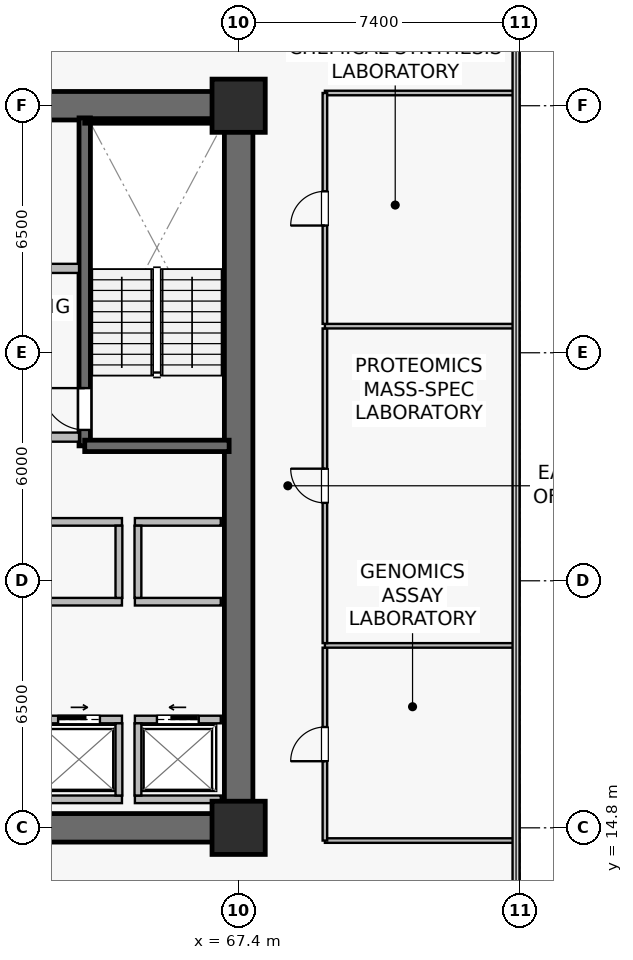
"""IFC4 building model, lengths in metres.
Left out: names, types, materials, properties, quantities, classifications, styles, units other than length and angle.
Written with IfcOpenShell. Run it as: python <this file> out.ifc"""

import sys

from ifc_helpers import new_model, si_unit, direction, frame, frame_2d, origin, origin_2d, place, context, subcontext, project, spatial, rectangle, extrude, source, transform, mapped, element, fill, save


model = new_model("IFC4")
c1 = context("Model", 3, precision=1e-05, world=origin(), true_north=direction((0.0, 1.0)))
c2 = subcontext(c1, "Body", "Model", "MODEL_VIEW")
j1 = project(units=[si_unit("LENGTHUNIT", "METRE"), si_unit("PLANEANGLEUNIT", "RADIAN")], contexts=[c1])
p1 = place(None, origin())
s1 = spatial("IfcSite", under=j1, at=p1, CompositionType="ELEMENT")
p2 = place(p1, origin())
s2 = spatial("IfcBuilding", under=s1, at=p2, CompositionType="ELEMENT")
p3 = place(p2, frame((0.0, 0.0, 45.7)))
s3 = spatial("IfcBuildingStorey", under=s2, at=p3, CompositionType="ELEMENT", Elevation=45.7)
p4 = place(p3, frame((52.225, 14.8, 0.0), z_axis=(0.0, 0.0, 1.0), x_axis=(1.0, 0.0, 0.0)))
e1 = element("IfcWall", 1, at=p4, inside=s3, PredefinedType="SHEAR", context=c2, shape_type="SweptSolid", body=[
    extrude(rectangle(XDim=15.55, YDim=0.75, at=frame_2d((7.775, 0.0))), origin(), (0.0, 0.0, 1.0), 3.78),
])
p5 = place(p3, frame((52.225, 33.8, 0.0), z_axis=(0.0, 0.0, 1.0), x_axis=(1.0, 0.0, 0.0)))
e2 = element("IfcWall", 2, at=p5, inside=s3, PredefinedType="SHEAR", context=c2, shape_type="SweptSolid", body=[
    extrude(rectangle(XDim=15.55, YDim=0.75, at=frame_2d((7.775, 0.0))), origin(), (0.0, 0.0, 1.0), 3.78),
])
p6 = place(p5, frame((8.875, 0.0, 0.0)))
e3 = element("IfcOpeningElement", 3, at=p6, cuts=e2, PredefinedType="OPENING", context=c2, shape_type="SweptSolid", body=[
    extrude(rectangle(XDim=0.95, YDim=2.15, at=frame_2d((0.475, 1.075))), frame((0.0, 0.385, 0.0), z_axis=(0.0, -1.0, 0.0), x_axis=(1.0, 0.0, 0.0)), (0.0, 0.0, 1.0), 0.77),
])
p7 = place(p5, frame((5.51, 0.0, 0.0)))
e4 = element("IfcOpeningElement", 4, at=p7, cuts=e2, PredefinedType="OPENING", context=c2, shape_type="SweptSolid", body=[
    extrude(rectangle(XDim=0.95, YDim=2.15, at=frame_2d((0.475, 1.075))), frame((0.0, 0.385, 0.0), z_axis=(0.0, -1.0, 0.0), x_axis=(1.0, 0.0, 0.0)), (0.0, 0.0, 1.0), 0.77),
])
p8 = place(p5, frame((2.11, 0.0, 0.0)))
e5 = element("IfcOpeningElement", 5, at=p8, cuts=e2, PredefinedType="OPENING", context=c2, shape_type="SweptSolid", body=[
    extrude(rectangle(XDim=0.95, YDim=2.15, at=frame_2d((0.475, 1.075))), frame((0.0, 0.385, 0.0), z_axis=(0.0, -1.0, 0.0), x_axis=(1.0, 0.0, 0.0)), (0.0, 0.0, 1.0), 0.77),
])
p9 = place(p3, frame((67.4, 15.175, 0.0), z_axis=(0.0, 0.0, 1.0), x_axis=(0.0, 1.0, 0.0)))
e6 = element("IfcWall", 6, at=p9, inside=s3, PredefinedType="SHEAR", context=c2, shape_type="SweptSolid", body=[
    extrude(rectangle(XDim=18.25, YDim=0.75, at=frame_2d((9.125, 0.0))), origin(), (0.0, 0.0, 1.0), 3.78),
])
p10 = place(p3, frame((63.35, 24.85, 0.0), z_axis=(0.0, 0.0, 1.0), x_axis=(0.0, 1.0, 0.0)))
e7 = element("IfcWall", 7, at=p10, inside=s3, PredefinedType="SHEAR", context=c2, shape_type="SweptSolid", body=[
    extrude(rectangle(XDim=8.63, YDim=0.3, at=frame_2d((4.315, 0.0))), origin(), (0.0, 0.0, 1.0), 3.78),
])
p11 = place(p10, frame((0.42, 0.0, 0.0)))
e8 = element("IfcOpeningElement", 8, at=p11, cuts=e7, PredefinedType="OPENING", context=c2, shape_type="SweptSolid", body=[
    extrude(rectangle(XDim=1.1, YDim=2.15, at=frame_2d((0.55, 1.075))), frame((0.0, 0.16, 0.0), z_axis=(0.0, -1.0, 0.0), x_axis=(1.0, 0.0, 0.0)), (0.0, 0.0, 1.0), 0.32),
])
p12 = place(p3, frame((63.35, 24.85, 0.0), z_axis=(0.0, 0.0, 1.0), x_axis=(1.0, 0.0, 0.0)))
e9 = element("IfcWall", 9, at=p12, inside=s3, PredefinedType="SHEAR", context=c2, shape_type="SweptSolid", body=[
    extrude(rectangle(XDim=3.8, YDim=0.3, at=frame_2d((1.9, 0.0))), origin(), (0.0, 0.0, 1.0), 3.78),
])
p13 = place(p3, frame((63.35, 33.4, 0.0), z_axis=(0.0, 0.0, 1.0), x_axis=(1.0, 0.0, 0.0)))
e10 = element("IfcWall", 10, at=p13, inside=s3, PredefinedType="SOLIDWALL", context=c2, shape_type="SweptSolid", body=[
    extrude(rectangle(XDim=3.72, YDim=0.12, at=frame_2d((1.86, 0.0))), origin(), (0.0, 0.0, 1.0), 3.78),
])
m1 = source(origin(), c2, "Body", "SweptSolid", [
    extrude(rectangle(XDim=1.4, YDim=1.4, at=origin_2d()), origin(), (0.0, 0.0, 1.0), 4.1),
])
for number, where, z_axis, x_axis in (
    (11, (67.4, 14.8, 0.0), (0.0, 0.0, 1.0), (1.0, 0.0, 0.0)),
    (12, (67.4, 33.8, 0.0), (0.0, 0.0, 1.0), (1.0, 0.0, 0.0)),
):
    element("IfcColumn", number, at=place(p3, frame(where, z_axis=z_axis, x_axis=x_axis)), inside=s3, PredefinedType="COLUMN", context=c2, shape_type="MappedRepresentation", body=[
        mapped(m1, transform((0.0, 0.0, 0.0), scale=1.0)),
    ])
p14 = place(p3, frame((56.28, 25.08, 0.0), z_axis=(0.0, 0.0, 1.0), x_axis=(1.0, 0.0, 0.0)))
e13 = element("IfcWall", 13, at=p14, inside=s3, PredefinedType="SOLIDWALL", context=c2, shape_type="SweptSolid", body=[
    extrude(rectangle(XDim=6.92, YDim=0.24, at=frame_2d((3.46, 0.0))), origin(), (0.0, 0.0, 1.0), 3.065),
])
p15 = place(p14, frame((2.6, 0.0, 0.0)))
e14 = element("IfcOpeningElement", 14, at=p15, cuts=e13, PredefinedType="OPENING", context=c2, shape_type="SweptSolid", body=[
    extrude(rectangle(XDim=1.2, YDim=2.16, at=frame_2d((0.6, 1.08))), frame((0.0, 0.13, 0.0), z_axis=(0.0, -1.0, 0.0), x_axis=(1.0, 0.0, 0.0)), (0.0, 0.0, 1.0), 0.26),
])
p16 = place(p3, frame((56.28, 29.52, 0.0), z_axis=(0.0, 0.0, 1.0), x_axis=(1.0, 0.0, 0.0)))
e15 = element("IfcWall", 15, at=p16, inside=s3, PredefinedType="SOLIDWALL", context=c2, shape_type="SweptSolid", body=[
    extrude(rectangle(XDim=6.92, YDim=0.24, at=frame_2d((3.46, 0.0))), origin(), (0.0, 0.0, 1.0), 3.065),
])
p17 = place(p3, frame((64.67, 17.65, 0.0), z_axis=(0.0, 0.0, 1.0), x_axis=(1.0, 0.0, 0.0)))
e16 = element("IfcWall", 16, at=p17, inside=s3, PredefinedType="SOLIDWALL", context=c2, shape_type="SweptSolid", body=[
    extrude(rectangle(XDim=2.26, YDim=0.2, at=frame_2d((1.13, 0.0))), origin(), (0.0, 0.0, 1.0), 3.78),
])
p18 = place(p17, frame((0.58, 0.0, 0.0)))
e17 = element("IfcOpeningElement", 17, at=p18, cuts=e16, PredefinedType="OPENING", context=c2, shape_type="SweptSolid", body=[
    extrude(rectangle(XDim=1.1, YDim=2.22, at=frame_2d((0.55, 1.11))), frame((0.0, 0.11, 0.0), z_axis=(0.0, -1.0, 0.0), x_axis=(1.0, 0.0, 0.0)), (0.0, 0.0, 1.0), 0.22),
])
p19 = place(p3, frame((64.67, 15.55, 0.0), z_axis=(0.0, 0.0, 1.0), x_axis=(1.0, 0.0, 0.0)))
e18 = element("IfcWall", 18, at=p19, inside=s3, PredefinedType="SOLIDWALL", context=c2, shape_type="SweptSolid", body=[
    extrude(rectangle(XDim=2.26, YDim=0.2, at=frame_2d((1.13, 0.0))), origin(), (0.0, 0.0, 1.0), 3.78),
])
p20 = place(p3, frame((64.75, 15.65, 0.0), z_axis=(0.0, 0.0, 1.0), x_axis=(0.0, 1.0, 0.0)))
e19 = element("IfcWall", 19, at=p20, inside=s3, PredefinedType="SOLIDWALL", context=c2, shape_type="SweptSolid", body=[
    extrude(rectangle(XDim=1.9, YDim=0.18, at=frame_2d((0.95, 0.0))), origin(), (0.0, 0.0, 1.0), 3.78),
])
p21 = place(p3, frame((62.07, 17.65, 0.0), z_axis=(0.0, 0.0, 1.0), x_axis=(1.0, 0.0, 0.0)))
e20 = element("IfcWall", 20, at=p21, inside=s3, PredefinedType="SOLIDWALL", context=c2, shape_type="SweptSolid", body=[
    extrude(rectangle(XDim=2.26, YDim=0.2, at=frame_2d((1.13, 0.0))), origin(), (0.0, 0.0, 1.0), 3.78),
])
p22 = place(p21, frame((0.58, 0.0, 0.0)))
e21 = element("IfcOpeningElement", 21, at=p22, cuts=e20, PredefinedType="OPENING", context=c2, shape_type="SweptSolid", body=[
    extrude(rectangle(XDim=1.1, YDim=2.22, at=frame_2d((0.55, 1.11))), frame((0.0, 0.11, 0.0), z_axis=(0.0, -1.0, 0.0), x_axis=(1.0, 0.0, 0.0)), (0.0, 0.0, 1.0), 0.22),
])
p23 = place(p3, frame((62.07, 15.55, 0.0), z_axis=(0.0, 0.0, 1.0), x_axis=(1.0, 0.0, 0.0)))
e22 = element("IfcWall", 22, at=p23, inside=s3, PredefinedType="SOLIDWALL", context=c2, shape_type="SweptSolid", body=[
    extrude(rectangle(XDim=2.26, YDim=0.2, at=frame_2d((1.13, 0.0))), origin(), (0.0, 0.0, 1.0), 3.78),
])
p24 = place(p3, frame((64.25, 15.65, 0.0), z_axis=(0.0, 0.0, 1.0), x_axis=(0.0, 1.0, 0.0)))
e23 = element("IfcWall", 23, at=p24, inside=s3, PredefinedType="SOLIDWALL", context=c2, shape_type="SweptSolid", body=[
    extrude(rectangle(XDim=1.9, YDim=0.18, at=frame_2d((0.95, 0.0))), origin(), (0.0, 0.0, 1.0), 3.78),
])
for number, where, z_axis, x_axis in (
    (24, (64.67, 20.75, 0.0), (0.0, 0.0, 1.0), (1.0, 0.0, 0.0)),
    (25, (64.67, 22.85, 0.0), (0.0, 0.0, 1.0), (1.0, 0.0, 0.0)),
):
    element("IfcWall", number, at=place(p3, frame(where, z_axis=z_axis, x_axis=x_axis)), inside=s3, PredefinedType="SOLIDWALL", context=c2, shape_type="SweptSolid", body=[
        extrude(rectangle(XDim=2.26, YDim=0.2, at=frame_2d((1.13, 0.0))), origin(), (0.0, 0.0, 1.0), 3.78),
    ])
p25 = place(p3, frame((64.75, 20.85, 0.0), z_axis=(0.0, 0.0, 1.0), x_axis=(0.0, 1.0, 0.0)))
e26 = element("IfcWall", 26, at=p25, inside=s3, PredefinedType="SOLIDWALL", context=c2, shape_type="SweptSolid", body=[
    extrude(rectangle(XDim=1.9, YDim=0.18, at=frame_2d((0.95, 0.0))), origin(), (0.0, 0.0, 1.0), 3.78),
])
for number, where, z_axis, x_axis in (
    (27, (62.07, 20.75, 0.0), (0.0, 0.0, 1.0), (1.0, 0.0, 0.0)),
    (28, (62.07, 22.85, 0.0), (0.0, 0.0, 1.0), (1.0, 0.0, 0.0)),
):
    element("IfcWall", number, at=place(p3, frame(where, z_axis=z_axis, x_axis=x_axis)), inside=s3, PredefinedType="SOLIDWALL", context=c2, shape_type="SweptSolid", body=[
        extrude(rectangle(XDim=2.26, YDim=0.2, at=frame_2d((1.13, 0.0))), origin(), (0.0, 0.0, 1.0), 3.78),
    ])
p26 = place(p3, frame((64.25, 20.85, 0.0), z_axis=(0.0, 0.0, 1.0), x_axis=(0.0, 1.0, 0.0)))
e29 = element("IfcWall", 29, at=p26, inside=s3, PredefinedType="SOLIDWALL", context=c2, shape_type="SweptSolid", body=[
    extrude(rectangle(XDim=1.9, YDim=0.18, at=frame_2d((0.95, 0.0))), origin(), (0.0, 0.0, 1.0), 3.78),
])
for number, where, z_axis, x_axis in (
    (30, (69.67, 14.465, 0.0), (0.0, 0.0, 1.0), (1.0, 0.0, 0.0)),
    (31, (69.67, 34.135, 0.0), (0.0, 0.0, 1.0), (1.0, 0.0, 0.0)),
):
    element("IfcWall", number, at=place(p3, frame(where, z_axis=z_axis, x_axis=x_axis)), inside=s3, PredefinedType="PARTITIONING", context=c2, shape_type="SweptSolid", body=[
        extrude(rectangle(XDim=5.02, YDim=0.12, at=frame_2d((2.51, 0.0))), origin(), (0.0, 0.0, 1.0), 3.78),
    ])
p27 = place(p3, frame((69.67, 14.465, 0.0), z_axis=(0.0, 0.0, 1.0), x_axis=(0.0, 1.0, 0.0)))
e32 = element("IfcWall", 32, at=p27, inside=s3, PredefinedType="PARTITIONING", context=c2, shape_type="SweptSolid", body=[
    extrude(rectangle(XDim=5.075, YDim=0.12, at=frame_2d((2.538, 0.0))), origin(), (0.0, 0.0, 1.0), 3.78),
])
p28 = place(p27, frame((2.087, 0.0, 0.0)))
e33 = element("IfcOpeningElement", 33, at=p28, cuts=e32, PredefinedType="OPENING", context=c2, shape_type="SweptSolid", body=[
    extrude(rectangle(XDim=0.9, YDim=2.1, at=frame_2d((0.45, 1.05))), frame((0.0, 0.07, 0.0), z_axis=(0.0, -1.0, 0.0), x_axis=(1.0, 0.0, 0.0)), (0.0, 0.0, 1.0), 0.14),
])
p29 = place(p3, frame((69.67, 19.6, 0.0), z_axis=(0.0, 0.0, 1.0), x_axis=(1.0, 0.0, 0.0)))
e34 = element("IfcWall", 34, at=p29, inside=s3, PredefinedType="PARTITIONING", context=c2, shape_type="SweptSolid", body=[
    extrude(rectangle(XDim=5.02, YDim=0.12, at=frame_2d((2.51, 0.0))), origin(), (0.0, 0.0, 1.0), 3.78),
])
p30 = place(p3, frame((69.67, 19.66, 0.0), z_axis=(0.0, 0.0, 1.0), x_axis=(0.0, 1.0, 0.0)))
e35 = element("IfcWall", 35, at=p30, inside=s3, PredefinedType="PARTITIONING", context=c2, shape_type="SweptSolid", body=[
    extrude(rectangle(XDim=8.28, YDim=0.12, at=frame_2d((4.14, 0.0))), origin(), (0.0, 0.0, 1.0), 3.78),
])
p31 = place(p30, frame((3.69, 0.0, 0.0)))
e36 = element("IfcOpeningElement", 36, at=p31, cuts=e35, PredefinedType="OPENING", context=c2, shape_type="SweptSolid", body=[
    extrude(rectangle(XDim=0.9, YDim=2.1, at=frame_2d((0.45, 1.05))), frame((0.0, 0.07, 0.0), z_axis=(0.0, -1.0, 0.0), x_axis=(1.0, 0.0, 0.0)), (0.0, 0.0, 1.0), 0.14),
])
p32 = place(p3, frame((69.67, 28.0, 0.0), z_axis=(0.0, 0.0, 1.0), x_axis=(1.0, 0.0, 0.0)))
e37 = element("IfcWall", 37, at=p32, inside=s3, PredefinedType="PARTITIONING", context=c2, shape_type="SweptSolid", body=[
    extrude(rectangle(XDim=5.02, YDim=0.12, at=frame_2d((2.51, 0.0))), origin(), (0.0, 0.0, 1.0), 3.78),
])
p33 = place(p3, frame((69.67, 28.06, 0.0), z_axis=(0.0, 0.0, 1.0), x_axis=(0.0, 1.0, 0.0)))
e38 = element("IfcWall", 38, at=p33, inside=s3, PredefinedType="PARTITIONING", context=c2, shape_type="SweptSolid", body=[
    extrude(rectangle(XDim=6.075, YDim=0.12, at=frame_2d((3.038, 0.0))), origin(), (0.0, 0.0, 1.0), 3.78),
])
p34 = place(p33, frame((2.587, 0.0, 0.0)))
e39 = element("IfcOpeningElement", 39, at=p34, cuts=e38, PredefinedType="OPENING", context=c2, shape_type="SweptSolid", body=[
    extrude(rectangle(XDim=0.9, YDim=2.1, at=frame_2d((0.45, 1.05))), frame((0.0, 0.07, 0.0), z_axis=(0.0, -1.0, 0.0), x_axis=(1.0, 0.0, 0.0)), (0.0, 0.0, 1.0), 0.14),
])
m2 = source(origin(), c2, "Body", "SweptSolid", [
    extrude(rectangle(XDim=1.1, YDim=2.15, at=frame_2d((0.55, 1.075))), frame((0.0, 0.025, 0.0), z_axis=(0.0, -1.0, 0.0), x_axis=(1.0, 0.0, 0.0)), (0.0, 0.0, 1.0), 0.05),
])
p35 = place(p11, origin())
e40 = element("IfcDoor", 40, at=p35, inside=s3, OperationType="SINGLE_SWING_RIGHT", PredefinedType="DOOR", context=c2, shape_type="MappedRepresentation", body=[
    mapped(m2, transform((0.0, 0.0, 0.0), scale=1.0)),
])
fill(e8, e40)
m3 = source(origin(), c2, "Body", "SweptSolid", [
    extrude(rectangle(XDim=1.1, YDim=2.22, at=frame_2d((0.55, 1.11))), frame((0.0, 0.025, 0.0), z_axis=(0.0, -1.0, 0.0), x_axis=(1.0, 0.0, 0.0)), (0.0, 0.0, 1.0), 0.05),
])
p36 = place(p18, origin())
e41 = element("IfcDoor", 41, at=p36, inside=s3, OperationType="SLIDING_TO_LEFT", PredefinedType="USERDEFINED", context=c2, shape_type="MappedRepresentation", body=[
    mapped(m3, transform((0.0, 0.0, 0.0), scale=1.0)),
])
fill(e17, e41)
p37 = place(p22, origin())
e42 = element("IfcDoor", 42, at=p37, inside=s3, OperationType="SLIDING_TO_RIGHT", PredefinedType="USERDEFINED", context=c2, shape_type="MappedRepresentation", body=[
    mapped(m3, transform((0.0, 0.0, 0.0), scale=1.0)),
])
fill(e21, e42)
m4 = source(origin(), c2, "Body", "SweptSolid", [
    extrude(rectangle(XDim=0.9, YDim=2.1, at=frame_2d((0.45, 1.05))), frame((0.0, 0.025, 0.0), z_axis=(0.0, -1.0, 0.0), x_axis=(1.0, 0.0, 0.0)), (0.0, 0.0, 1.0), 0.05),
])
p38 = place(p28, origin())
e43 = element("IfcDoor", 43, at=p38, inside=s3, OperationType="SINGLE_SWING_LEFT", PredefinedType="DOOR", context=c2, shape_type="MappedRepresentation", body=[
    mapped(m4, transform((0.0, 0.0, 0.0), scale=1.0)),
])
fill(e33, e43)
p39 = place(p31, origin())
e44 = element("IfcDoor", 44, at=p39, inside=s3, OperationType="SINGLE_SWING_RIGHT", PredefinedType="DOOR", context=c2, shape_type="MappedRepresentation", body=[
    mapped(m4, transform((0.0, 0.0, 0.0), scale=1.0)),
])
fill(e36, e44)
p40 = place(p34, origin())
e45 = element("IfcDoor", 45, at=p40, inside=s3, OperationType="SINGLE_SWING_LEFT", PredefinedType="DOOR", context=c2, shape_type="MappedRepresentation", body=[
    mapped(m4, transform((0.0, 0.0, 0.0), scale=1.0)),
])
fill(e39, e45)
save(model, sys.argv[1])
